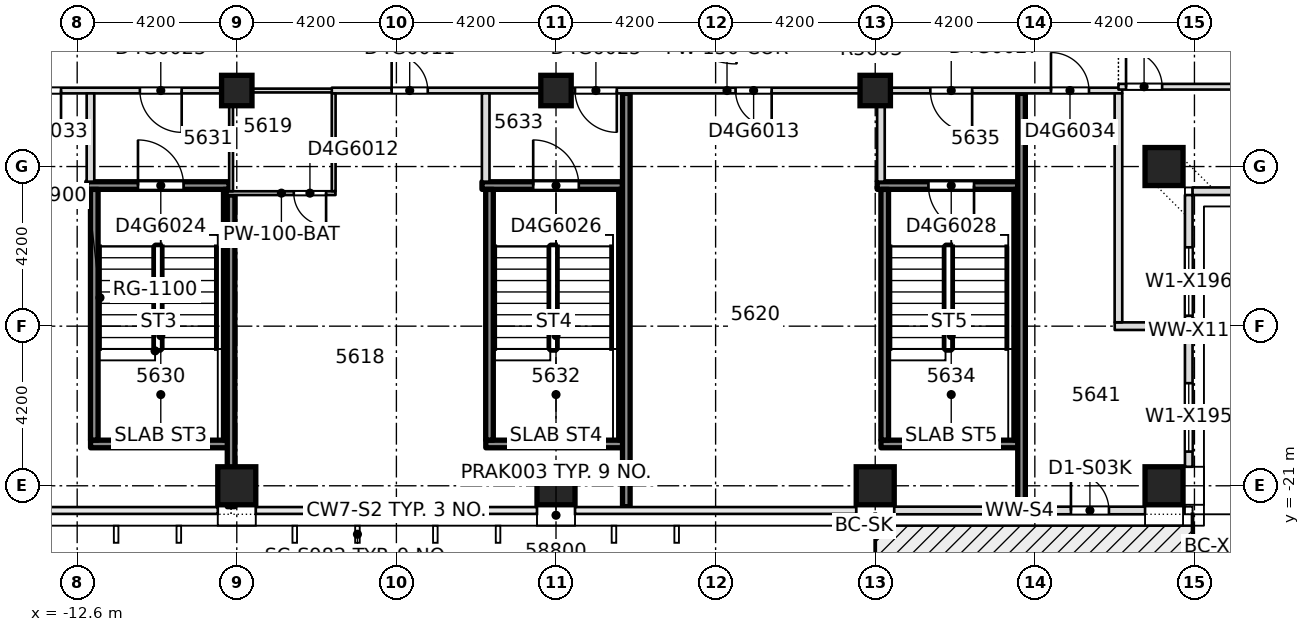
"""IFC4 building model, lengths in metres.
Left out: names, types, materials, properties, quantities, classifications, styles, units other than length and angle.
Written with IfcOpenShell. Run it as: python <this file> out.ifc"""

import sys

from ifc_helpers import new_model, si_unit, direction, frame, frame_2d, origin, origin_2d, place, context, subcontext, project, spatial, rectangle, extrude, element, fill, save


model = new_model("IFC4")
c1 = context("Model", 3, precision=1e-05, world=origin(), true_north=direction((0.0, 1.0)))
c2 = subcontext(c1, "Body", "Model", "MODEL_VIEW")
j1 = project(units=[si_unit("LENGTHUNIT", "METRE"), si_unit("PLANEANGLEUNIT", "RADIAN")], contexts=[c1])
p1 = place(None, origin())
s1 = spatial("IfcSite", under=j1, at=p1, CompositionType="ELEMENT")
p2 = place(p1, origin())
s2 = spatial("IfcBuilding", under=s1, at=p2, CompositionType="ELEMENT")
p3 = place(p2, frame((0.0, 0.0, 213.5)))
s3 = spatial("IfcBuildingStorey", under=s2, at=p3, CompositionType="ELEMENT", Elevation=213.5)
for number, where, z_axis, x_axis in (
    (1, (-8.4, -21.0, -0.4), (0.0, 0.0, 1.0), (1.0, 0.0, 0.0)),
    (2, (0.0, -21.0, -0.4), (0.0, 0.0, 1.0), (1.0, 0.0, 0.0)),
    (3, (8.4, -21.0, -0.4), (0.0, 0.0, 1.0), (1.0, 0.0, 0.0)),
    (4, (16.0, -21.0, -0.4), (0.0, 0.0, 1.0), (1.0, 0.0, 0.0)),
    (5, (16.0, -12.6, -0.4), (0.0, 0.0, 1.0), (1.0, 0.0, 0.0)),
):
    element("IfcColumn", number, at=place(p3, frame(where, z_axis=z_axis, x_axis=x_axis)), inside=s3, PredefinedType="COLUMN", context=c2, shape_type="SweptSolid", body=[
        extrude(rectangle(XDim=1.0, YDim=1.0, at=origin_2d()), origin(), (0.0, 0.0, 1.0), 3.85),
    ])
p4 = place(p3, frame((-8.4, -10.6, -0.4), z_axis=(0.0, 0.0, 1.0), x_axis=(1.0, 0.0, 0.0)))
e6 = element("IfcColumn", 6, at=p4, inside=s3, PredefinedType="COLUMN", context=c2, shape_type="SweptSolid", body=[
    extrude(rectangle(XDim=0.8, YDim=0.8, at=origin_2d()), origin(), (0.0, 0.0, 1.0), 3.85),
])
p5 = place(p3, frame((0.0, -10.6, -0.4), z_axis=(0.0, 0.0, 1.0), x_axis=(1.0, 0.0, 0.0)))
e7 = element("IfcColumn", 7, at=p5, inside=s3, PredefinedType="COLUMN", context=c2, shape_type="SweptSolid", body=[
    extrude(rectangle(XDim=0.8, YDim=0.8, at=origin_2d()), origin(), (0.0, 0.0, 1.0), 3.4),
])
p6 = place(p3, frame((8.4, -10.6, -0.4), z_axis=(0.0, 0.0, 1.0), x_axis=(1.0, 0.0, 0.0)))
e8 = element("IfcColumn", 8, at=p6, inside=s3, PredefinedType="COLUMN", context=c2, shape_type="SweptSolid", body=[
    extrude(rectangle(XDim=0.8, YDim=0.8, at=origin_2d()), origin(), (0.0, 0.0, 1.0), 3.85),
])
p7 = place(p3, frame((-12.248, -19.9, 0.0), z_axis=(0.0, 0.0, 1.0), x_axis=(1.0, 0.0, 0.0)))
e9 = element("IfcWall", 9, at=p7, inside=s3, PredefinedType="SOLIDWALL", context=c2, shape_type="SweptSolid", body=[
    extrude(rectangle(XDim=3.696, YDim=0.2, at=frame_2d((1.848, 0.0))), origin(), (0.0, 0.0, 1.0), 3.0),
])
p8 = place(p3, frame((-1.848, -19.9, 0.0), z_axis=(0.0, 0.0, 1.0), x_axis=(1.0, 0.0, 0.0)))
e10 = element("IfcWall", 10, at=p8, inside=s3, PredefinedType="SOLIDWALL", context=c2, shape_type="SweptSolid", body=[
    extrude(rectangle(XDim=3.696, YDim=0.2, at=frame_2d((1.848, 0.0))), origin(), (0.0, 0.0, 1.0), 3.0),
])
p9 = place(p3, frame((8.552, -19.9, 0.0), z_axis=(0.0, 0.0, 1.0), x_axis=(1.0, 0.0, 0.0)))
e11 = element("IfcWall", 11, at=p9, inside=s3, PredefinedType="SOLIDWALL", context=c2, shape_type="SweptSolid", body=[
    extrude(rectangle(XDim=3.696, YDim=0.2, at=frame_2d((1.848, 0.0))), origin(), (0.0, 0.0, 1.0), 3.0),
])
p10 = place(p3, frame((14.702, -16.8, 0.0), z_axis=(0.0, 0.0, 1.0), x_axis=(1.0, 0.0, 0.0)))
e12 = element("IfcWall", 12, at=p10, inside=s3, PredefinedType="PARTITIONING", context=c2, shape_type="SweptSolid", body=[
    extrude(rectangle(XDim=1.848, YDim=0.2, at=frame_2d((0.924, 0.0))), origin(), (0.0, 0.0, 1.0), 3.0),
])
p11 = place(p3, frame((-8.65, -13.3, 0.0), z_axis=(0.0, 0.0, 1.0), x_axis=(1.0, 0.0, 0.0)))
e13 = element("IfcWall", 13, at=p11, inside=s3, PredefinedType="PARTITIONING", context=c2, shape_type="SweptSolid", body=[
    extrude(rectangle(XDim=2.848, YDim=0.1, at=frame_2d((1.424, 0.0))), origin(), (0.0, 0.0, 1.0), 3.0),
])
p12 = place(p11, frame((1.75, 0.0, 0.0)))
e14 = element("IfcOpeningElement", 14, at=p12, cuts=e13, PredefinedType="OPENING", context=c2, shape_type="SweptSolid", body=[
    extrude(rectangle(XDim=0.85, YDim=2.1, at=frame_2d((0.425, 1.05))), frame((0.0, 0.06, 0.0), z_axis=(0.0, -1.0, 0.0), x_axis=(1.0, 0.0, 0.0)), (0.0, 0.0, 1.0), 0.12),
])
p13 = place(p3, frame((-12.348, -13.1, 0.0), z_axis=(0.0, 0.0, 1.0), x_axis=(1.0, 0.0, 0.0)))
e15 = element("IfcWall", 15, at=p13, inside=s3, PredefinedType="SOLIDWALL", context=c2, shape_type="SweptSolid", body=[
    extrude(rectangle(XDim=3.746, YDim=0.2, at=frame_2d((1.873, 0.0))), origin(), (0.0, 0.0, 1.0), 3.0),
])
p14 = place(p13, frame((1.348, 0.0, 0.0)))
e16 = element("IfcOpeningElement", 16, at=p14, cuts=e15, PredefinedType="OPENING", context=c2, shape_type="SweptSolid", body=[
    extrude(rectangle(XDim=1.2, YDim=2.1, at=frame_2d((0.6, 1.05))), frame((0.0, 0.11, 0.0), z_axis=(0.0, -1.0, 0.0), x_axis=(1.0, 0.0, 0.0)), (0.0, 0.0, 1.0), 0.22),
])
p15 = place(p3, frame((-1.948, -13.1, 0.0), z_axis=(0.0, 0.0, 1.0), x_axis=(1.0, 0.0, 0.0)))
e17 = element("IfcWall", 17, at=p15, inside=s3, PredefinedType="SOLIDWALL", context=c2, shape_type="SweptSolid", body=[
    extrude(rectangle(XDim=3.696, YDim=0.2, at=frame_2d((1.848, 0.0))), origin(), (0.0, 0.0, 1.0), 3.0),
])
p16 = place(p15, frame((1.348, 0.0, 0.0)))
e18 = element("IfcOpeningElement", 18, at=p16, cuts=e17, PredefinedType="OPENING", context=c2, shape_type="SweptSolid", body=[
    extrude(rectangle(XDim=1.2, YDim=2.1, at=frame_2d((0.6, 1.05))), frame((0.0, 0.11, 0.0), z_axis=(0.0, -1.0, 0.0), x_axis=(1.0, 0.0, 0.0)), (0.0, 0.0, 1.0), 0.22),
])
p17 = place(p3, frame((8.452, -13.1, 0.0), z_axis=(0.0, 0.0, 1.0), x_axis=(1.0, 0.0, 0.0)))
e19 = element("IfcWall", 19, at=p17, inside=s3, PredefinedType="SOLIDWALL", context=c2, shape_type="SweptSolid", body=[
    extrude(rectangle(XDim=3.696, YDim=0.2, at=frame_2d((1.848, 0.0))), origin(), (0.0, 0.0, 1.0), 3.0),
])
p18 = place(p17, frame((1.348, 0.0, 0.0)))
e20 = element("IfcOpeningElement", 20, at=p18, cuts=e19, PredefinedType="OPENING", context=c2, shape_type="SweptSolid", body=[
    extrude(rectangle(XDim=1.2, YDim=2.1, at=frame_2d((0.6, 1.05))), frame((0.0, 0.11, 0.0), z_axis=(0.0, -1.0, 0.0), x_axis=(1.0, 0.0, 0.0)), (0.0, 0.0, 1.0), 0.22),
])
p19 = place(p3, frame((-14.9, -10.6, 0.0), z_axis=(0.0, 0.0, 1.0), x_axis=(1.0, 0.0, 0.0)))
e21 = element("IfcWall", 21, at=p19, inside=s3, PredefinedType="PARTITIONING", context=c2, shape_type="SweptSolid", body=[
    extrude(rectangle(XDim=6.4, YDim=0.15, at=frame_2d((3.2, 0.0))), origin(), (0.0, 0.0, 1.0), 3.0),
])
p20 = place(p19, frame((3.95, 0.0, 0.0)))
e22 = element("IfcOpeningElement", 22, at=p20, cuts=e21, PredefinedType="OPENING", context=c2, shape_type="SweptSolid", body=[
    extrude(rectangle(XDim=1.1, YDim=2.1, at=frame_2d((0.55, 1.05))), frame((0.0, 0.085, 0.0), z_axis=(0.0, -1.0, 0.0), x_axis=(1.0, 0.0, 0.0)), (0.0, 0.0, 1.0), 0.17),
])
p21 = place(p19, frame((0.875, 0.0, 0.0)))
e23 = element("IfcOpeningElement", 23, at=p21, cuts=e21, PredefinedType="OPENING", context=c2, shape_type="SweptSolid", body=[
    extrude(rectangle(XDim=1.0, YDim=2.1, at=frame_2d((0.5, 1.05))), frame((0.0, 0.085, 0.0), z_axis=(0.0, -1.0, 0.0), x_axis=(1.0, 0.0, 0.0)), (0.0, 0.0, 1.0), 0.17),
])
p22 = place(p3, frame((-8.6, -10.6, 0.0), z_axis=(0.0, 0.0, 1.0), x_axis=(1.0, 0.0, 0.0)))
e24 = element("IfcWall", 24, at=p22, inside=s3, PredefinedType="PARTITIONING", context=c2, shape_type="SweptSolid", body=[
    extrude(rectangle(XDim=2.8, YDim=0.1, at=frame_2d((1.4, 0.0))), origin(), (0.0, 0.0, 1.0), 3.0),
])
p23 = place(p3, frame((-5.9, -10.6, 0.0), z_axis=(0.0, 0.0, 1.0), x_axis=(1.0, 0.0, 0.0)))
e25 = element("IfcWall", 25, at=p23, inside=s3, PredefinedType="PARTITIONING", context=c2, shape_type="SweptSolid", body=[
    extrude(rectangle(XDim=20.8, YDim=0.15, at=frame_2d((10.4, 0.0))), origin(), (0.0, 0.0, 1.0), 3.0),
])
p24 = place(p23, frame((1.575, 0.0, 0.0)))
e26 = element("IfcOpeningElement", 26, at=p24, cuts=e25, PredefinedType="OPENING", context=c2, shape_type="SweptSolid", body=[
    extrude(rectangle(XDim=0.95, YDim=2.1, at=frame_2d((0.475, 1.05))), frame((0.0, 0.085, 0.0), z_axis=(0.0, -1.0, 0.0), x_axis=(1.0, 0.0, 0.0)), (0.0, 0.0, 1.0), 0.17),
])
p25 = place(p23, frame((10.625, 0.0, 0.0)))
e27 = element("IfcOpeningElement", 27, at=p25, cuts=e25, PredefinedType="OPENING", context=c2, shape_type="SweptSolid", body=[
    extrude(rectangle(XDim=0.95, YDim=2.1, at=frame_2d((0.475, 1.05))), frame((0.0, 0.085, 0.0), z_axis=(0.0, -1.0, 0.0), x_axis=(1.0, 0.0, 0.0)), (0.0, 0.0, 1.0), 0.17),
])
p26 = place(p23, frame((6.4, 0.0, 0.0)))
e28 = element("IfcOpeningElement", 28, at=p26, cuts=e25, PredefinedType="OPENING", context=c2, shape_type="SweptSolid", body=[
    extrude(rectangle(XDim=1.1, YDim=2.1, at=frame_2d((0.55, 1.05))), frame((0.0, 0.085, 0.0), z_axis=(0.0, -1.0, 0.0), x_axis=(1.0, 0.0, 0.0)), (0.0, 0.0, 1.0), 0.17),
])
p27 = place(p23, frame((15.75, 0.0, 0.0)))
e29 = element("IfcOpeningElement", 29, at=p27, cuts=e25, PredefinedType="OPENING", context=c2, shape_type="SweptSolid", body=[
    extrude(rectangle(XDim=1.1, YDim=2.1, at=frame_2d((0.55, 1.05))), frame((0.0, 0.085, 0.0), z_axis=(0.0, -1.0, 0.0), x_axis=(1.0, 0.0, 0.0)), (0.0, 0.0, 1.0), 0.17),
])
p28 = place(p23, frame((18.925, 0.0, 0.0)))
e30 = element("IfcOpeningElement", 30, at=p28, cuts=e25, PredefinedType="OPENING", context=c2, shape_type="SweptSolid", body=[
    extrude(rectangle(XDim=1.0, YDim=2.1, at=frame_2d((0.5, 1.05))), frame((0.0, 0.085, 0.0), z_axis=(0.0, -1.0, 0.0), x_axis=(1.0, 0.0, 0.0)), (0.0, 0.0, 1.0), 0.17),
])
p29 = place(p3, frame((14.8, -10.5, 0.0), z_axis=(0.0, 0.0, 1.0), x_axis=(1.0, 0.0, 0.0)))
e31 = element("IfcWall", 31, at=p29, inside=s3, PredefinedType="PARTITIONING", context=c2, shape_type="SweptSolid", body=[
    extrude(rectangle(XDim=10.95, YDim=0.15, at=frame_2d((5.475, 0.0))), origin(), (0.0, 0.0, 1.0), 3.0),
])
p30 = place(p29, frame((0.2, 0.0, 0.0)))
e32 = element("IfcOpeningElement", 32, at=p30, cuts=e31, PredefinedType="OPENING", context=c2, shape_type="SweptSolid", body=[
    extrude(rectangle(XDim=0.95, YDim=2.1, at=frame_2d((0.475, 1.05))), frame((0.0, 0.085, 0.0), z_axis=(0.0, -1.0, 0.0), x_axis=(1.0, 0.0, 0.0)), (0.0, 0.0, 1.0), 0.17),
])
p31 = place(p3, frame((-12.25, -12.998, 0.0), z_axis=(0.0, 0.0, 1.0), x_axis=(0.0, 1.0, 0.0)))
e33 = element("IfcWall", 33, at=p31, inside=s3, PredefinedType="PARTITIONING", context=c2, shape_type="SweptSolid", body=[
    extrude(rectangle(XDim=2.323, YDim=0.2, at=frame_2d((1.162, 0.0))), origin(), (0.0, 0.0, 1.0), 3.0),
])
for number, where, z_axis, x_axis in (
    (34, (-12.15, -19.798, 0.0), (0.0, 0.0, 1.0), (0.0, 1.0, 0.0)),
    (35, (-8.65, -19.798, 0.0), (0.0, 0.0, 1.0), (0.0, 1.0, 0.0)),
):
    element("IfcWall", number, at=place(p3, frame(where, z_axis=z_axis, x_axis=x_axis)), inside=s3, PredefinedType="SOLIDWALL", context=c2, shape_type="SweptSolid", body=[
        extrude(rectangle(XDim=6.596, YDim=0.2, at=frame_2d((3.298, 0.0))), origin(), (0.0, 0.0, 1.0), 3.0),
    ])
p32 = place(p3, frame((-8.55, -13.25, 0.0), z_axis=(0.0, 0.0, 1.0), x_axis=(0.0, 1.0, 0.0)))
e36 = element("IfcWall", 36, at=p32, inside=s3, PredefinedType="PARTITIONING", context=c2, shape_type="SweptSolid", body=[
    extrude(rectangle(XDim=2.575, YDim=0.1, at=frame_2d((1.288, 0.0))), origin(), (0.0, 0.0, 1.0), 3.0),
])
p33 = place(p3, frame((-5.85, -13.248, 0.0), z_axis=(0.0, 0.0, 1.0), x_axis=(0.0, 1.0, 0.0)))
e37 = element("IfcWall", 37, at=p33, inside=s3, PredefinedType="PARTITIONING", context=c2, shape_type="SweptSolid", body=[
    extrude(rectangle(XDim=2.573, YDim=0.1, at=frame_2d((1.287, 0.0))), origin(), (0.0, 0.0, 1.0), 3.0),
])
p34 = place(p3, frame((-1.85, -12.998, 0.0), z_axis=(0.0, 0.0, 1.0), x_axis=(0.0, 1.0, 0.0)))
e38 = element("IfcWall", 38, at=p34, inside=s3, PredefinedType="PARTITIONING", context=c2, shape_type="SweptSolid", body=[
    extrude(rectangle(XDim=2.323, YDim=0.2, at=frame_2d((1.162, 0.0))), origin(), (0.0, 0.0, 1.0), 3.0),
])
for number, where, z_axis, x_axis in (
    (39, (-1.75, -19.798, 0.0), (0.0, 0.0, 1.0), (0.0, 1.0, 0.0)),
    (40, (1.75, -19.798, 0.0), (0.0, 0.0, 1.0), (0.0, 1.0, 0.0)),
):
    element("IfcWall", number, at=place(p3, frame(where, z_axis=z_axis, x_axis=x_axis)), inside=s3, PredefinedType="SOLIDWALL", context=c2, shape_type="SweptSolid", body=[
        extrude(rectangle(XDim=6.596, YDim=0.2, at=frame_2d((3.298, 0.0))), origin(), (0.0, 0.0, 1.0), 3.0),
    ])
p35 = place(p3, frame((8.55, -12.998, 0.0), z_axis=(0.0, 0.0, 1.0), x_axis=(0.0, 1.0, 0.0)))
e41 = element("IfcWall", 41, at=p35, inside=s3, PredefinedType="PARTITIONING", context=c2, shape_type="SweptSolid", body=[
    extrude(rectangle(XDim=2.323, YDim=0.2, at=frame_2d((1.162, 0.0))), origin(), (0.0, 0.0, 1.0), 3.0),
])
for number, where, z_axis, x_axis in (
    (42, (8.65, -19.798, 0.0), (0.0, 0.0, 1.0), (0.0, 1.0, 0.0)),
    (43, (12.15, -19.798, 0.0), (0.0, 0.0, 1.0), (0.0, 1.0, 0.0)),
):
    element("IfcWall", number, at=place(p3, frame(where, z_axis=z_axis, x_axis=x_axis)), inside=s3, PredefinedType="SOLIDWALL", context=c2, shape_type="SweptSolid", body=[
        extrude(rectangle(XDim=6.596, YDim=0.2, at=frame_2d((3.298, 0.0))), origin(), (0.0, 0.0, 1.0), 3.0),
    ])
p36 = place(p3, frame((14.8, -16.698, 0.0), z_axis=(0.0, 0.0, 1.0), x_axis=(0.0, 1.0, 0.0)))
e44 = element("IfcWall", 44, at=p36, inside=s3, PredefinedType="PARTITIONING", context=c2, shape_type="SweptSolid", body=[
    extrude(rectangle(XDim=6.023, YDim=0.2, at=frame_2d((3.011, 0.0))), origin(), (0.0, 0.0, 1.0), 3.0),
])
p37 = place(p3, frame((8.9, -21.65, 0.0), z_axis=(0.0, 0.0, 1.0), x_axis=(1.0, 0.0, 0.0)))
e45 = element("IfcWall", 45, at=p37, inside=s3, PredefinedType="STANDARD", context=c2, shape_type="SweptSolid", body=[
    extrude(rectangle(XDim=6.6, YDim=0.2, at=frame_2d((3.3, 0.0))), origin(), (0.0, 0.0, 1.0), 3.0),
])
p38 = place(p37, frame((4.65, 0.0, 0.0)))
e46 = element("IfcOpeningElement", 46, at=p38, cuts=e45, PredefinedType="OPENING", context=c2, shape_type="SweptSolid", body=[
    extrude(rectangle(XDim=1.0, YDim=2.4, at=frame_2d((0.5, 1.2))), frame((0.0, 0.11, 0.0), z_axis=(0.0, -1.0, 0.0), x_axis=(1.0, 0.0, 0.0)), (0.0, 0.0, 1.0), 0.22),
])
p39 = place(p3, frame((16.65, -20.5, 0.0), z_axis=(0.0, 0.0, 1.0), x_axis=(0.0, 1.0, 0.0)))
e47 = element("IfcWall", 47, at=p39, inside=s3, PredefinedType="STANDARD", context=c2, shape_type="SweptSolid", body=[
    extrude(rectangle(XDim=7.15, YDim=0.2, at=frame_2d((3.575, 0.0))), origin(), (0.0, 0.0, 1.0), 3.0),
])
p40 = place(p39, frame((0.4, 0.0, 0.2)))
e48 = element("IfcOpeningElement", 48, at=p40, cuts=e47, PredefinedType="OPENING", context=c2, shape_type="SweptSolid", body=[
    extrude(rectangle(XDim=1.8, YDim=2.65, at=frame_2d((0.9, 1.325))), frame((0.0, 0.11, 0.0), z_axis=(0.0, -1.0, 0.0), x_axis=(1.0, 0.0, 0.0)), (0.0, 0.0, 1.0), 0.22),
])
p41 = place(p39, frame((3.975, 0.0, 0.2)))
e49 = element("IfcOpeningElement", 49, at=p41, cuts=e47, PredefinedType="OPENING", context=c2, shape_type="SweptSolid", body=[
    extrude(rectangle(XDim=1.8, YDim=2.65, at=frame_2d((0.9, 1.325))), frame((0.0, 0.11, 0.0), z_axis=(0.0, -1.0, 0.0), x_axis=(1.0, 0.0, 0.0)), (0.0, 0.0, 1.0), 0.22),
])
p42 = place(p3, frame((16.75, -13.25, 0.0), z_axis=(0.0, 0.0, 1.0), x_axis=(1.0, 0.0, 0.0)))
e50 = element("IfcWall", 50, at=p42, inside=s3, PredefinedType="STANDARD", context=c2, shape_type="SweptSolid", body=[
    extrude(rectangle(XDim=7.95, YDim=0.2, at=frame_2d((3.975, 0.0))), origin(), (0.0, 0.0, 1.0), 3.0),
])
p43 = place(p3, frame((-8.55, -21.55, 0.0), z_axis=(0.0, 0.0, 1.0), x_axis=(0.0, 1.0, 0.0)))
e51 = element("IfcWall", 51, at=p43, inside=s3, PredefinedType="SOLIDWALL", context=c2, shape_type="SweptSolid", body=[
    extrude(rectangle(XDim=8.2, YDim=0.2, at=frame_2d((4.1, 0.0))), origin(), (0.0, 0.0, 1.0), 3.0),
])
for number, where, z_axis, x_axis in (
    (52, (1.85, -21.55, 0.0), (0.0, 0.0, 1.0), (0.0, 1.0, 0.0)),
    (53, (12.25, -21.55, 0.0), (0.0, 0.0, 1.0), (0.0, 1.0, 0.0)),
):
    element("IfcWall", number, at=place(p3, frame(where, z_axis=z_axis, x_axis=x_axis)), inside=s3, PredefinedType="SOLIDWALL", context=c2, shape_type="SweptSolid", body=[
        extrude(rectangle(XDim=10.875, YDim=0.2, at=frame_2d((5.438, 0.0))), origin(), (0.0, 0.0, 1.0), 3.0),
    ])
p44 = place(p24, origin())
e54 = element("IfcDoor", 54, at=p44, inside=s3, OperationType="SINGLE_SWING_LEFT", PredefinedType="DOOR", context=c2, shape_type="SweptSolid", body=[
    extrude(rectangle(XDim=0.95, YDim=2.1, at=frame_2d((0.475, 1.05))), frame((0.0, 0.025, 0.0), z_axis=(0.0, -1.0, 0.0), x_axis=(1.0, 0.0, 0.0)), (0.0, 0.0, 1.0), 0.05),
])
fill(e26, e54)
p45 = place(p12, origin())
e55 = element("IfcDoor", 55, at=p45, inside=s3, OperationType="SINGLE_SWING_RIGHT", PredefinedType="DOOR", context=c2, shape_type="SweptSolid", body=[
    extrude(rectangle(XDim=0.85, YDim=2.1, at=frame_2d((0.425, 1.05))), frame((0.0, 0.025, 0.0), z_axis=(0.0, -1.0, 0.0), x_axis=(1.0, 0.0, 0.0)), (0.0, 0.0, 1.0), 0.05),
])
fill(e14, e55)
p46 = place(p25, origin())
e56 = element("IfcDoor", 56, at=p46, inside=s3, OperationType="SINGLE_SWING_RIGHT", PredefinedType="DOOR", context=c2, shape_type="SweptSolid", body=[
    extrude(rectangle(XDim=0.95, YDim=2.1, at=frame_2d((0.475, 1.05))), frame((0.0, 0.025, 0.0), z_axis=(0.0, -1.0, 0.0), x_axis=(1.0, 0.0, 0.0)), (0.0, 0.0, 1.0), 0.05),
])
fill(e27, e56)
p47 = place(p30, origin())
e57 = element("IfcDoor", 57, at=p47, inside=s3, OperationType="SINGLE_SWING_RIGHT", PredefinedType="DOOR", context=c2, shape_type="SweptSolid", body=[
    extrude(rectangle(XDim=0.95, YDim=2.1, at=frame_2d((0.475, 1.05))), frame((0.0, 0.025, 0.0), z_axis=(0.0, -1.0, 0.0), x_axis=(1.0, 0.0, 0.0)), (0.0, 0.0, 1.0), 0.05),
])
fill(e32, e57)
p48 = place(p20, origin())
e58 = element("IfcDoor", 58, at=p48, inside=s3, OperationType="SINGLE_SWING_RIGHT", PredefinedType="DOOR", context=c2, shape_type="SweptSolid", body=[
    extrude(rectangle(XDim=1.1, YDim=2.1, at=frame_2d((0.55, 1.05))), frame((0.0, 0.025, 0.0), z_axis=(0.0, -1.0, 0.0), x_axis=(1.0, 0.0, 0.0)), (0.0, 0.0, 1.0), 0.05),
])
fill(e22, e58)
p49 = place(p14, origin())
e59 = element("IfcDoor", 59, at=p49, inside=s3, OperationType="SINGLE_SWING_RIGHT", PredefinedType="DOOR", context=c2, shape_type="SweptSolid", body=[
    extrude(rectangle(XDim=1.2, YDim=2.1, at=frame_2d((0.6, 1.05))), frame((0.0, 0.025, 0.0), z_axis=(0.0, -1.0, 0.0), x_axis=(1.0, 0.0, 0.0)), (0.0, 0.0, 1.0), 0.05),
])
fill(e16, e59)
p50 = place(p26, origin())
e60 = element("IfcDoor", 60, at=p50, inside=s3, OperationType="SINGLE_SWING_LEFT", PredefinedType="DOOR", context=c2, shape_type="SweptSolid", body=[
    extrude(rectangle(XDim=1.1, YDim=2.1, at=frame_2d((0.55, 1.05))), frame((0.0, 0.025, 0.0), z_axis=(0.0, -1.0, 0.0), x_axis=(1.0, 0.0, 0.0)), (0.0, 0.0, 1.0), 0.05),
])
fill(e28, e60)
p51 = place(p16, origin())
e61 = element("IfcDoor", 61, at=p51, inside=s3, OperationType="SINGLE_SWING_RIGHT", PredefinedType="DOOR", context=c2, shape_type="SweptSolid", body=[
    extrude(rectangle(XDim=1.2, YDim=2.1, at=frame_2d((0.6, 1.05))), frame((0.0, 0.025, 0.0), z_axis=(0.0, -1.0, 0.0), x_axis=(1.0, 0.0, 0.0)), (0.0, 0.0, 1.0), 0.05),
])
fill(e18, e61)
p52 = place(p27, origin())
e62 = element("IfcDoor", 62, at=p52, inside=s3, OperationType="SINGLE_SWING_LEFT", PredefinedType="DOOR", context=c2, shape_type="SweptSolid", body=[
    extrude(rectangle(XDim=1.1, YDim=2.1, at=frame_2d((0.55, 1.05))), frame((0.0, 0.025, 0.0), z_axis=(0.0, -1.0, 0.0), x_axis=(1.0, 0.0, 0.0)), (0.0, 0.0, 1.0), 0.05),
])
fill(e29, e62)
p53 = place(p18, origin())
e63 = element("IfcDoor", 63, at=p53, inside=s3, OperationType="SINGLE_SWING_RIGHT", PredefinedType="DOOR", context=c2, shape_type="SweptSolid", body=[
    extrude(rectangle(XDim=1.2, YDim=2.1, at=frame_2d((0.6, 1.05))), frame((0.0, 0.025, 0.0), z_axis=(0.0, -1.0, 0.0), x_axis=(1.0, 0.0, 0.0)), (0.0, 0.0, 1.0), 0.05),
])
fill(e20, e63)
p54 = place(p21, origin())
e64 = element("IfcDoor", 64, at=p54, inside=s3, OperationType="SINGLE_SWING_RIGHT", PredefinedType="DOOR", context=c2, shape_type="SweptSolid", body=[
    extrude(rectangle(XDim=1.0, YDim=2.1, at=frame_2d((0.5, 1.05))), frame((0.0, 0.025, 0.0), z_axis=(0.0, -1.0, 0.0), x_axis=(1.0, 0.0, 0.0)), (0.0, 0.0, 1.0), 0.05),
])
fill(e23, e64)
p55 = place(p28, origin())
e65 = element("IfcDoor", 65, at=p55, inside=s3, OperationType="SINGLE_SWING_LEFT", PredefinedType="DOOR", context=c2, shape_type="SweptSolid", body=[
    extrude(rectangle(XDim=1.0, YDim=2.1, at=frame_2d((0.5, 1.05))), frame((0.0, 0.025, 0.0), z_axis=(0.0, -1.0, 0.0), x_axis=(1.0, 0.0, 0.0)), (0.0, 0.0, 1.0), 0.05),
])
fill(e30, e65)
p56 = place(p38, origin())
e66 = element("IfcDoor", 66, at=p56, inside=s3, OperationType="SINGLE_SWING_LEFT", PredefinedType="DOOR", context=c2, shape_type="SweptSolid", body=[
    extrude(rectangle(XDim=1.0, YDim=2.4, at=frame_2d((0.5, 1.2))), frame((0.0, 0.025, 0.0), z_axis=(0.0, -1.0, 0.0), x_axis=(1.0, 0.0, 0.0)), (0.0, 0.0, 1.0), 0.05),
])
fill(e46, e66)
p57 = place(p40, origin())
e67 = element("IfcWindow", 67, at=p57, inside=s3, PartitioningType="SINGLE_PANEL", PredefinedType="WINDOW", context=c2, shape_type="SweptSolid", body=[
    extrude(rectangle(XDim=1.8, YDim=2.65, at=frame_2d((0.9, 1.325))), frame((0.0, 0.03, 0.0), z_axis=(0.0, -1.0, 0.0), x_axis=(1.0, 0.0, 0.0)), (0.0, 0.0, 1.0), 0.06),
])
fill(e48, e67)
p58 = place(p41, origin())
e68 = element("IfcWindow", 68, at=p58, inside=s3, PartitioningType="SINGLE_PANEL", PredefinedType="WINDOW", context=c2, shape_type="SweptSolid", body=[
    extrude(rectangle(XDim=1.8, YDim=2.65, at=frame_2d((0.9, 1.325))), frame((0.0, 0.03, 0.0), z_axis=(0.0, -1.0, 0.0), x_axis=(1.0, 0.0, 0.0)), (0.0, 0.0, 1.0), 0.06),
])
fill(e49, e68)
save(model, sys.argv[1])
